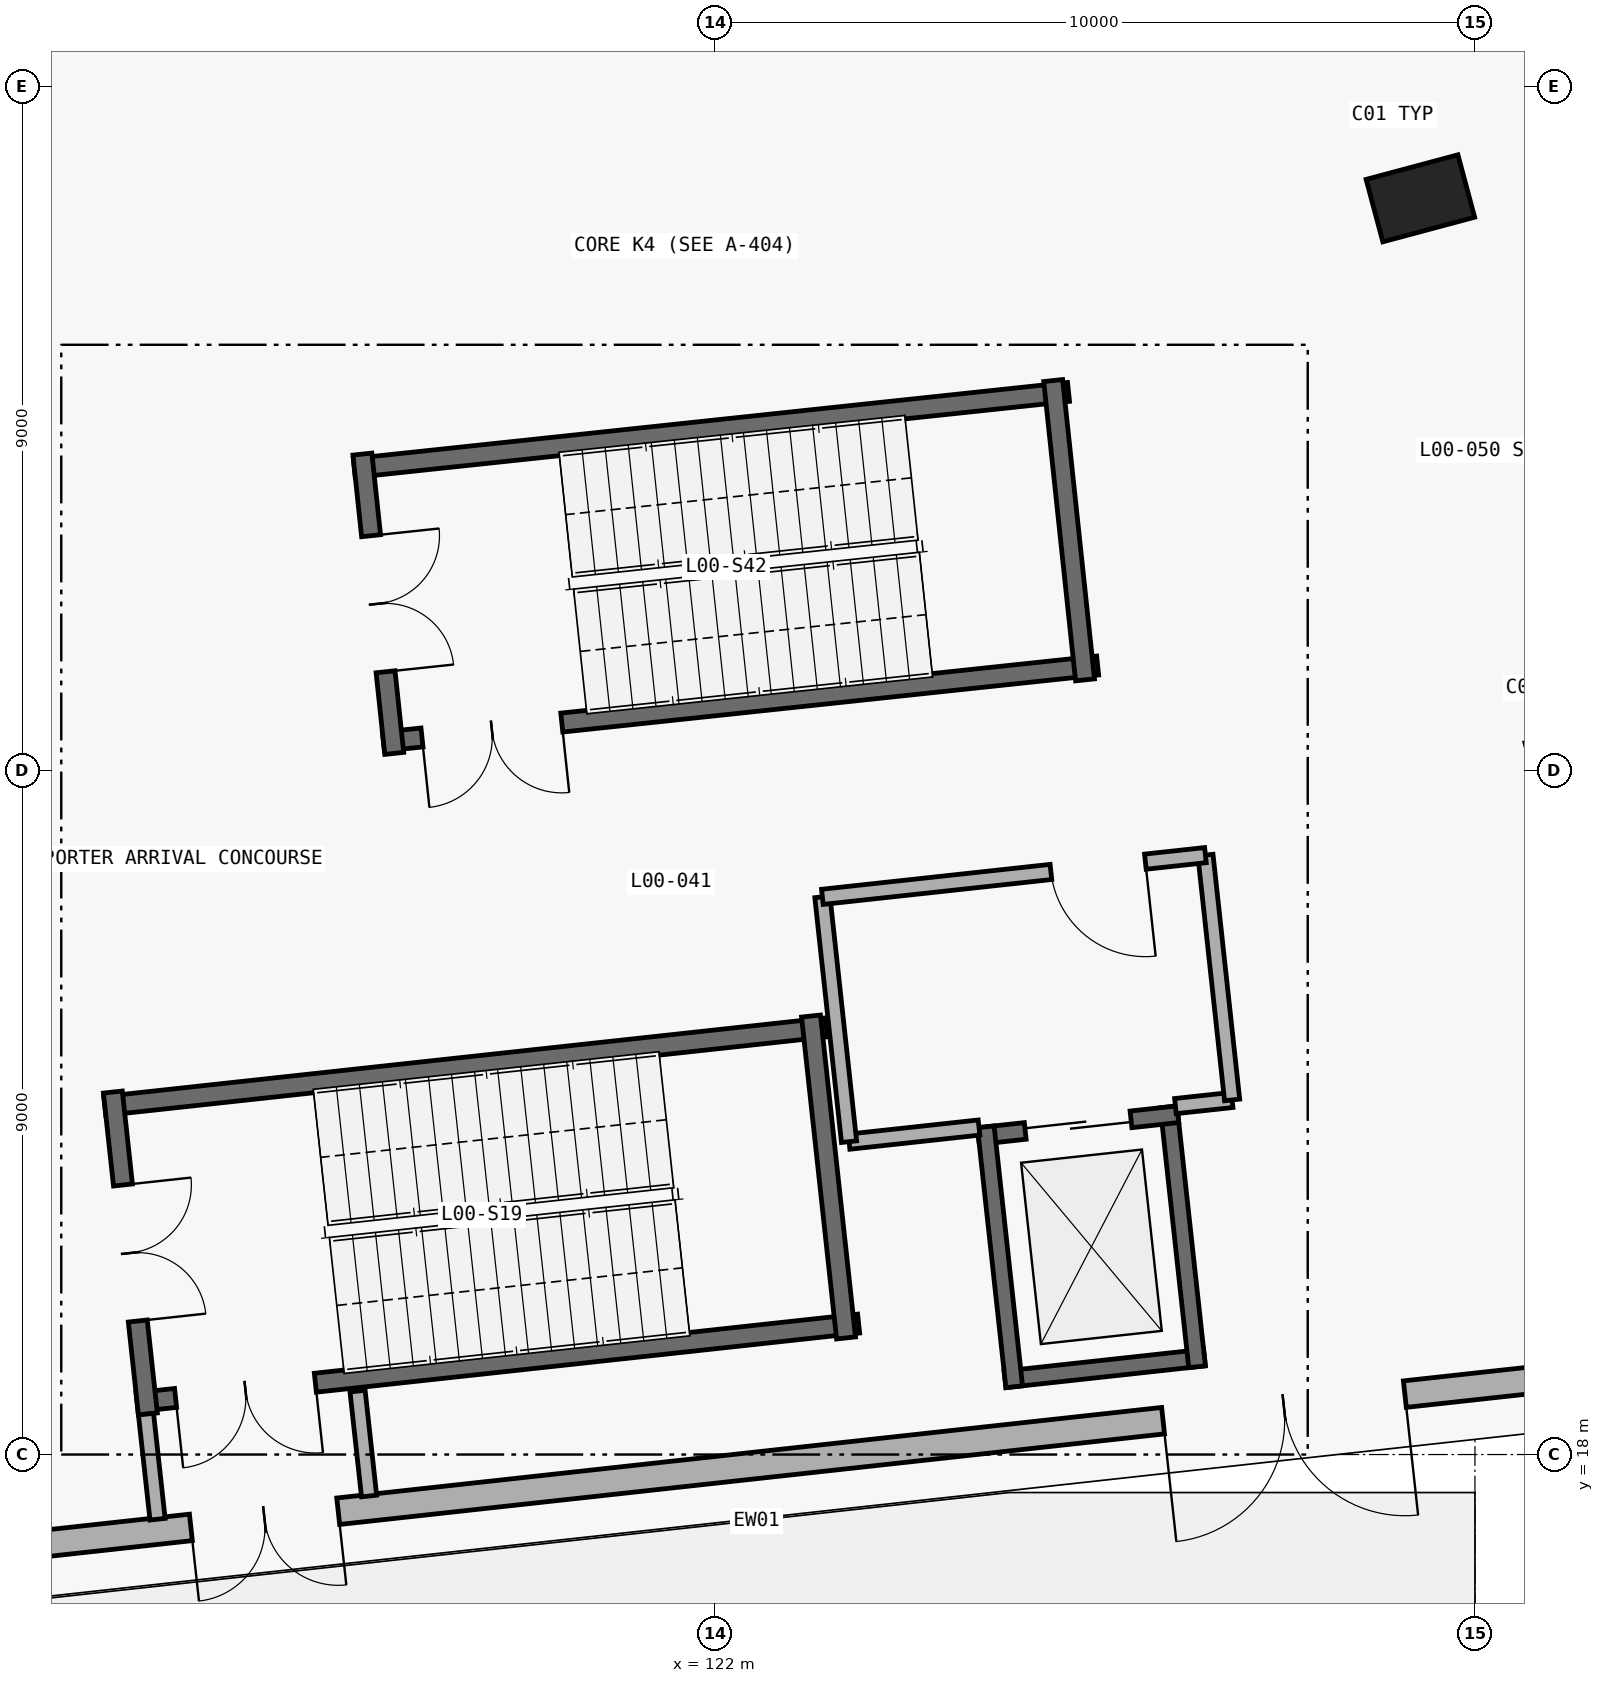
"""IFC4 building model, lengths in metres.
Left out: names, types, materials, properties, quantities, classifications, styles, units other than length and angle.
Written with IfcOpenShell. Run it as: python <this file> out.ifc"""

import sys

from ifc_helpers import new_model, si_unit, direction, frame, frame_2d, origin, origin_2d, place, context, subcontext, project, spatial, rectangle, extrude, element, fill, save


model = new_model("IFC4")
c1 = context("Model", 3, precision=1e-05, world=origin(), true_north=direction((0.0, 1.0)))
c2 = subcontext(c1, "Body", "Model", "MODEL_VIEW")
j1 = project(units=[si_unit("LENGTHUNIT", "METRE"), si_unit("PLANEANGLEUNIT", "RADIAN")], contexts=[c1])
p1 = place(None, origin())
s1 = spatial("IfcSite", under=j1, at=p1, CompositionType="ELEMENT")
p2 = place(p1, origin())
s2 = spatial("IfcBuilding", under=s1, at=p2, CompositionType="ELEMENT")
p3 = place(p2, origin())
s3 = spatial("IfcBuildingStorey", under=s2, at=p3, CompositionType="ELEMENT", Elevation=0.0)
p4 = place(p3, frame((131.282, 34.527, 0.0), z_axis=(0.0, 0.0, 1.0), x_axis=(-0.258819045103, 0.965925826289, 0.0)))
e1 = element("IfcColumn", 1, at=p4, inside=s3, PredefinedType="COLUMN", context=c2, shape_type="SweptSolid", body=[
    extrude(rectangle(XDim=0.85, YDim=1.25, at=origin_2d()), origin(), (0.0, 0.0, 1.0), 5.4),
])
p5 = place(p3, frame((133.301, 26.993, 0.0), z_axis=(0.0, 0.0, 1.0), x_axis=(-0.258819045103, 0.965925826289, 0.0)))
e2 = element("IfcColumn", 2, at=p5, inside=s3, PredefinedType="COLUMN", context=c2, shape_type="SweptSolid", body=[
    extrude(rectangle(XDim=1.05, YDim=1.05, at=origin_2d()), origin(), (0.0, 0.0, 1.0), 5.4),
])
p6 = place(p3, frame((134.843, 19.208, 0.0), z_axis=(0.0, 0.0, 1.0), x_axis=(-0.994028735725, -0.10911861689, 0.0)))
e3 = element("IfcWall", 3, at=p6, inside=s3, PredefinedType="STANDARD", context=c2, shape_type="SweptSolid", body=[
    extrude(rectangle(XDim=22.452, YDim=0.35, at=frame_2d((11.226, 0.0))), origin(), (0.0, 0.0, 1.0), 4.165),
])
p7 = place(p6, frame((17.906, 0.0, 0.0)))
e4 = element("IfcOpeningElement", 4, at=p7, cuts=e3, PredefinedType="OPENING", context=c2, shape_type="SweptSolid", body=[
    extrude(rectangle(XDim=1.95, YDim=2.25, at=frame_2d((0.975, 1.125))), frame((0.0, 0.185, 0.0), z_axis=(0.0, -1.0, 0.0), x_axis=(1.0, 0.0, 0.0)), (0.0, 0.0, 1.0), 0.37),
])
p8 = place(p6, frame((3.788, 0.0, 0.0)))
e5 = element("IfcOpeningElement", 5, at=p8, cuts=e3, PredefinedType="OPENING", context=c2, shape_type="SweptSolid", body=[
    extrude(rectangle(XDim=3.2, YDim=2.6, at=frame_2d((1.6, 1.3))), frame((0.0, 0.185, 0.0), z_axis=(0.0, -1.0, 0.0), x_axis=(1.0, 0.0, 0.0)), (0.0, 0.0, 1.0), 0.37),
])
p9 = place(p3, frame((123.891, 19.723, 0.0), z_axis=(0.0, 0.0, 1.0), x_axis=(-0.994127555169, -0.108214620337, 0.0)))
e6 = element("IfcWall", 6, at=p9, inside=s3, PredefinedType="SHEAR", context=c2, shape_type="SweptSolid", body=[
    extrude(rectangle(XDim=9.55, YDim=0.25, at=frame_2d((4.775, 0.0))), origin(), (0.0, 0.0, 1.0), 5.1),
])
p10 = place(p9, frame((7.19, 0.0, 0.0)))
e7 = element("IfcOpeningElement", 7, at=p10, cuts=e6, PredefinedType="OPENING", context=c2, shape_type="SweptSolid", body=[
    extrude(rectangle(XDim=1.85, YDim=2.3, at=frame_2d((0.925, 1.15))), frame((0.0, 0.135, 0.0), z_axis=(0.0, -1.0, 0.0), x_axis=(1.0, 0.0, 0.0)), (0.0, 0.0, 1.0), 0.27),
])
p11 = place(p3, frame((123.467, 23.62, 0.0), z_axis=(0.0, 0.0, 1.0), x_axis=(-0.994127555169, -0.108214620337, 0.0)))
e8 = element("IfcWall", 8, at=p11, inside=s3, PredefinedType="SHEAR", context=c2, shape_type="SweptSolid", body=[
    extrude(rectangle(XDim=9.55, YDim=0.25, at=frame_2d((4.775, 0.0))), origin(), (0.0, 0.0, 1.0), 5.1),
])
p12 = place(p3, frame((114.079, 22.769, 0.0), z_axis=(0.0, 0.0, 1.0), x_axis=(0.108198315262, -0.994129329903, 0.0)))
e9 = element("IfcWall", 9, at=p12, inside=s3, PredefinedType="SHEAR", context=c2, shape_type="SweptSolid", body=[
    extrude(rectangle(XDim=4.26, YDim=0.25, at=frame_2d((2.13, 0.0))), origin(), (0.0, 0.0, 1.0), 5.1),
])
p13 = place(p12, frame((1.23, 0.0, 0.0)))
e10 = element("IfcOpeningElement", 10, at=p13, cuts=e9, PredefinedType="OPENING", context=c2, shape_type="SweptSolid", body=[
    extrude(rectangle(XDim=1.8, YDim=2.25, at=frame_2d((0.9, 1.125))), frame((0.0, 0.135, 0.0), z_axis=(0.0, -1.0, 0.0), x_axis=(1.0, 0.0, 0.0)), (0.0, 0.0, 1.0), 0.27),
])
p14 = place(p3, frame((123.726, 19.534, 0.0), z_axis=(0.0, 0.0, 1.0), x_axis=(-0.108204479885, 0.994128658944, 0.0)))
e11 = element("IfcWall", 11, at=p14, inside=s3, PredefinedType="SHEAR", context=c2, shape_type="SweptSolid", body=[
    extrude(rectangle(XDim=4.26, YDim=0.25, at=frame_2d((2.13, 0.0))), origin(), (0.0, 0.0, 1.0), 5.1),
])
p15 = place(p3, frame((127.036, 28.38, 0.0), z_axis=(0.0, 0.0, 1.0), x_axis=(-0.994379889371, -0.105870844028, 0.0)))
e12 = element("IfcWall", 12, at=p15, inside=s3, PredefinedType="SHEAR", context=c2, shape_type="SweptSolid", body=[
    extrude(rectangle(XDim=9.45, YDim=0.25, at=frame_2d((4.725, 0.0))), origin(), (0.0, 0.0, 1.0), 5.1),
])
p16 = place(p15, frame((7.09, 0.0, 0.0)))
e13 = element("IfcOpeningElement", 13, at=p16, cuts=e12, PredefinedType="OPENING", context=c2, shape_type="SweptSolid", body=[
    extrude(rectangle(XDim=1.85, YDim=2.3, at=frame_2d((0.925, 1.15))), frame((0.0, 0.135, 0.0), z_axis=(0.0, -1.0, 0.0), x_axis=(1.0, 0.0, 0.0)), (0.0, 0.0, 1.0), 0.27),
])
p17 = place(p3, frame((126.653, 31.98, 0.0), z_axis=(0.0, 0.0, 1.0), x_axis=(-0.994382608826, -0.105845298736, 0.0)))
e14 = element("IfcWall", 14, at=p17, inside=s3, PredefinedType="SHEAR", context=c2, shape_type="SweptSolid", body=[
    extrude(rectangle(XDim=9.45, YDim=0.25, at=frame_2d((4.725, 0.0))), origin(), (0.0, 0.0, 1.0), 5.1),
])
p18 = place(p3, frame((117.362, 31.162, 0.0), z_axis=(0.0, 0.0, 1.0), x_axis=(0.105856095603, -0.994381459513, 0.0)))
e15 = element("IfcWall", 15, at=p18, inside=s3, PredefinedType="SHEAR", context=c2, shape_type="SweptSolid", body=[
    extrude(rectangle(XDim=3.96, YDim=0.25, at=frame_2d((1.98, 0.0))), origin(), (0.0, 0.0, 1.0), 5.1),
])
p19 = place(p18, frame((1.08, 0.0, 0.0)))
e16 = element("IfcOpeningElement", 16, at=p19, cuts=e15, PredefinedType="OPENING", context=c2, shape_type="SweptSolid", body=[
    extrude(rectangle(XDim=1.8, YDim=2.25, at=frame_2d((0.9, 1.125))), frame((0.0, 0.135, 0.0), z_axis=(0.0, -1.0, 0.0), x_axis=(1.0, 0.0, 0.0)), (0.0, 0.0, 1.0), 0.27),
])
p20 = place(p3, frame((126.87, 28.192, 0.0), z_axis=(0.0, 0.0, 1.0), x_axis=(-0.105856095603, 0.994381459513, 0.0)))
e17 = element("IfcWall", 17, at=p20, inside=s3, PredefinedType="SHEAR", context=c2, shape_type="SweptSolid", body=[
    extrude(rectangle(XDim=3.96, YDim=0.25, at=frame_2d((1.98, 0.0))), origin(), (0.0, 0.0, 1.0), 5.1),
])
p21 = place(p3, frame((114.515, 18.531, 0.0), z_axis=(0.0, 0.0, 1.0), x_axis=(0.109371701479, -0.994000920983, 0.0)))
e18 = element("IfcWall", 18, at=p21, inside=s3, PredefinedType="PARTITIONING", context=c2, shape_type="SweptSolid", body=[
    extrude(rectangle(XDim=1.391, YDim=0.2, at=frame_2d((0.695, 0.0))), origin(), (0.0, 0.0, 1.0), 4.165),
])
p22 = place(p3, frame((117.299, 18.834, 0.0), z_axis=(0.0, 0.0, 1.0), x_axis=(0.109022528394, -0.994039279054, 0.0)))
e19 = element("IfcWall", 19, at=p22, inside=s3, PredefinedType="PARTITIONING", context=c2, shape_type="SweptSolid", body=[
    extrude(rectangle(XDim=1.388, YDim=0.2, at=frame_2d((0.694, 0.0))), origin(), (0.0, 0.0, 1.0), 4.165),
])
p23 = place(p3, frame((125.817, 18.989, 0.0), z_axis=(0.0, 0.0, 1.0), x_axis=(0.994077313431, 0.108675180804, 0.0)))
e20 = element("IfcWall", 20, at=p23, inside=s3, PredefinedType="SHEAR", context=c2, shape_type="SweptSolid", body=[
    extrude(rectangle(XDim=2.64, YDim=0.22, at=frame_2d((1.32, 0.0))), origin(), (0.0, 0.0, 1.0), 5.1),
])
p24 = place(p3, frame((128.344, 19.155, 0.0), z_axis=(0.0, 0.0, 1.0), x_axis=(-0.108748511736, 0.994069293961, 0.0)))
e21 = element("IfcWall", 21, at=p24, inside=s3, PredefinedType="SHEAR", context=c2, shape_type="SweptSolid", body=[
    extrude(rectangle(XDim=3.439, YDim=0.22, at=frame_2d((1.72, 0.0))), origin(), (0.0, 0.0, 1.0), 5.1),
])
p25 = place(p3, frame((128.091, 22.477, 0.0), z_axis=(0.0, 0.0, 1.0), x_axis=(-0.994067317545, -0.108766576613, 0.0)))
e22 = element("IfcWall", 22, at=p25, inside=s3, PredefinedType="SHEAR", context=c2, shape_type="SweptSolid", body=[
    extrude(rectangle(XDim=2.64, YDim=0.22, at=frame_2d((1.32, 0.0))), origin(), (0.0, 0.0, 1.0), 5.1),
])
p26 = place(p25, frame((0.62, 0.0, 0.0)))
e23 = element("IfcOpeningElement", 23, at=p26, cuts=e22, PredefinedType="OPENING", context=c2, shape_type="SweptSolid", body=[
    extrude(rectangle(XDim=1.4, YDim=2.2, at=frame_2d((0.7, 1.1))), frame((0.0, 0.12, 0.0), z_axis=(0.0, -1.0, 0.0), x_axis=(1.0, 0.0, 0.0)), (0.0, 0.0, 1.0), 0.24),
])
p27 = place(p3, frame((125.564, 22.311, 0.0), z_axis=(0.0, 0.0, 1.0), x_axis=(0.108748511736, -0.994069293961, 0.0)))
e24 = element("IfcWall", 24, at=p27, inside=s3, PredefinedType="SHEAR", context=c2, shape_type="SweptSolid", body=[
    extrude(rectangle(XDim=3.439, YDim=0.22, at=frame_2d((1.72, 0.0))), origin(), (0.0, 0.0, 1.0), 5.1),
])
p28 = place(p3, frame((128.805, 22.665, 0.0), z_axis=(0.0, 0.0, 1.0), x_axis=(-0.994146742738, -0.108038205757, 0.0)))
e25 = element("IfcWall", 25, at=p28, inside=s3, PredefinedType="PARTITIONING", context=c2, shape_type="SweptSolid", body=[
    extrude(rectangle(XDim=0.75, YDim=0.2, at=frame_2d((0.375, 0.0))), origin(), (0.0, 0.0, 1.0), 5.08),
])
p29 = place(p3, frame((125.475, 22.302, 0.0), z_axis=(0.0, 0.0, 1.0), x_axis=(-0.994135511072, -0.108141507414, 0.0)))
e26 = element("IfcWall", 26, at=p29, inside=s3, PredefinedType="PARTITIONING", context=c2, shape_type="SweptSolid", body=[
    extrude(rectangle(XDim=1.72, YDim=0.2, at=frame_2d((0.86, 0.0))), origin(), (0.0, 0.0, 1.0), 5.08),
])
for number, where, z_axis, x_axis in (
    (27, (128.805, 22.665, 0.0), (0.0, 0.0, 1.0), (-0.108, 0.994, 0.0)),
    (28, (123.765, 22.116, 0.0), (0.0, 0.0, 1.0), (-0.108, 0.994, 0.0)),
):
    element("IfcWall", number, at=place(p3, frame(where, z_axis=z_axis, x_axis=x_axis)), inside=s3, PredefinedType="PARTITIONING", context=c2, shape_type="SweptSolid", body=[
        extrude(rectangle(XDim=3.24, YDim=0.2, at=frame_2d((1.62, 0.0))), origin(), (0.0, 0.0, 1.0), 5.08),
    ])
p30 = place(p3, frame((128.454, 25.886, 0.0), z_axis=(0.0, 0.0, 1.0), x_axis=(-0.994118117986, -0.108301281116, 0.0)))
e29 = element("IfcWall", 29, at=p30, inside=s3, PredefinedType="PARTITIONING", context=c2, shape_type="SweptSolid", body=[
    extrude(rectangle(XDim=5.07, YDim=0.2, at=frame_2d((2.535, 0.0))), origin(), (0.0, 0.0, 1.0), 5.08),
])
p31 = place(p30, frame((0.795, 0.0, 0.0)))
e30 = element("IfcOpeningElement", 30, at=p31, cuts=e29, PredefinedType="OPENING", context=c2, shape_type="SweptSolid", body=[
    extrude(rectangle(XDim=1.25, YDim=2.2, at=frame_2d((0.625, 1.1))), frame((0.0, 0.11, 0.0), z_axis=(0.0, -1.0, 0.0), x_axis=(1.0, 0.0, 0.0)), (0.0, 0.0, 1.0), 0.22),
])
p32 = place(p7, origin())
e31 = element("IfcDoor", 31, at=p32, inside=s3, OperationType="DOUBLE_DOOR_SINGLE_SWING", PredefinedType="DOOR", context=c2, shape_type="SweptSolid", body=[
    extrude(rectangle(XDim=1.95, YDim=2.25, at=frame_2d((0.975, 1.125))), frame((0.0, 0.025, 0.0), z_axis=(0.0, -1.0, 0.0), x_axis=(1.0, 0.0, 0.0)), (0.0, 0.0, 1.0), 0.05),
])
fill(e4, e31)
p33 = place(p8, origin())
e32 = element("IfcDoor", 32, at=p33, inside=s3, OperationType="DOUBLE_DOOR_SINGLE_SWING", PredefinedType="DOOR", context=c2, shape_type="SweptSolid", body=[
    extrude(rectangle(XDim=3.2, YDim=2.6, at=frame_2d((1.6, 1.3))), frame((0.0, 0.025, 0.0), z_axis=(0.0, -1.0, 0.0), x_axis=(1.0, 0.0, 0.0)), (0.0, 0.0, 1.0), 0.05),
])
fill(e5, e32)
p34 = place(p13, origin())
e33 = element("IfcDoor", 33, at=p34, inside=s3, OperationType="DOUBLE_DOOR_SINGLE_SWING", PredefinedType="DOOR", context=c2, shape_type="SweptSolid", body=[
    extrude(rectangle(XDim=1.8, YDim=2.25, at=frame_2d((0.9, 1.125))), frame((0.0, 0.025, 0.0), z_axis=(0.0, -1.0, 0.0), x_axis=(1.0, 0.0, 0.0)), (0.0, 0.0, 1.0), 0.05),
])
fill(e10, e33)
p35 = place(p10, origin())
e34 = element("IfcDoor", 34, at=p35, inside=s3, OperationType="DOUBLE_DOOR_SINGLE_SWING", PredefinedType="DOOR", context=c2, shape_type="SweptSolid", body=[
    extrude(rectangle(XDim=1.85, YDim=2.3, at=frame_2d((0.925, 1.15))), frame((0.0, 0.025, 0.0), z_axis=(0.0, -1.0, 0.0), x_axis=(1.0, 0.0, 0.0)), (0.0, 0.0, 1.0), 0.05),
])
fill(e7, e34)
p36 = place(p19, origin())
e35 = element("IfcDoor", 35, at=p36, inside=s3, OperationType="DOUBLE_DOOR_SINGLE_SWING", PredefinedType="DOOR", context=c2, shape_type="SweptSolid", body=[
    extrude(rectangle(XDim=1.8, YDim=2.25, at=frame_2d((0.9, 1.125))), frame((0.0, 0.025, 0.0), z_axis=(0.0, -1.0, 0.0), x_axis=(1.0, 0.0, 0.0)), (0.0, 0.0, 1.0), 0.05),
])
fill(e16, e35)
p37 = place(p16, origin())
e36 = element("IfcDoor", 36, at=p37, inside=s3, OperationType="DOUBLE_DOOR_SINGLE_SWING", PredefinedType="DOOR", context=c2, shape_type="SweptSolid", body=[
    extrude(rectangle(XDim=1.85, YDim=2.3, at=frame_2d((0.925, 1.15))), frame((0.0, 0.025, 0.0), z_axis=(0.0, -1.0, 0.0), x_axis=(1.0, 0.0, 0.0)), (0.0, 0.0, 1.0), 0.05),
])
fill(e13, e36)
p38 = place(p26, origin())
e37 = element("IfcDoor", 37, at=p38, inside=s3, OperationType="SLIDING_TO_LEFT", PredefinedType="DOOR", context=c2, shape_type="SweptSolid", body=[
    extrude(rectangle(XDim=1.4, YDim=2.2, at=frame_2d((0.7, 1.1))), frame((0.0, 0.025, 0.0), z_axis=(0.0, -1.0, 0.0), x_axis=(1.0, 0.0, 0.0)), (0.0, 0.0, 1.0), 0.05),
])
fill(e23, e37)
p39 = place(p31, origin())
e38 = element("IfcDoor", 38, at=p39, inside=s3, OperationType="SINGLE_SWING_LEFT", PredefinedType="DOOR", context=c2, shape_type="SweptSolid", body=[
    extrude(rectangle(XDim=1.25, YDim=2.2, at=frame_2d((0.625, 1.1))), frame((0.0, 0.025, 0.0), z_axis=(0.0, -1.0, 0.0), x_axis=(1.0, 0.0, 0.0)), (0.0, 0.0, 1.0), 0.05),
])
fill(e30, e38)
save(model, sys.argv[1])
